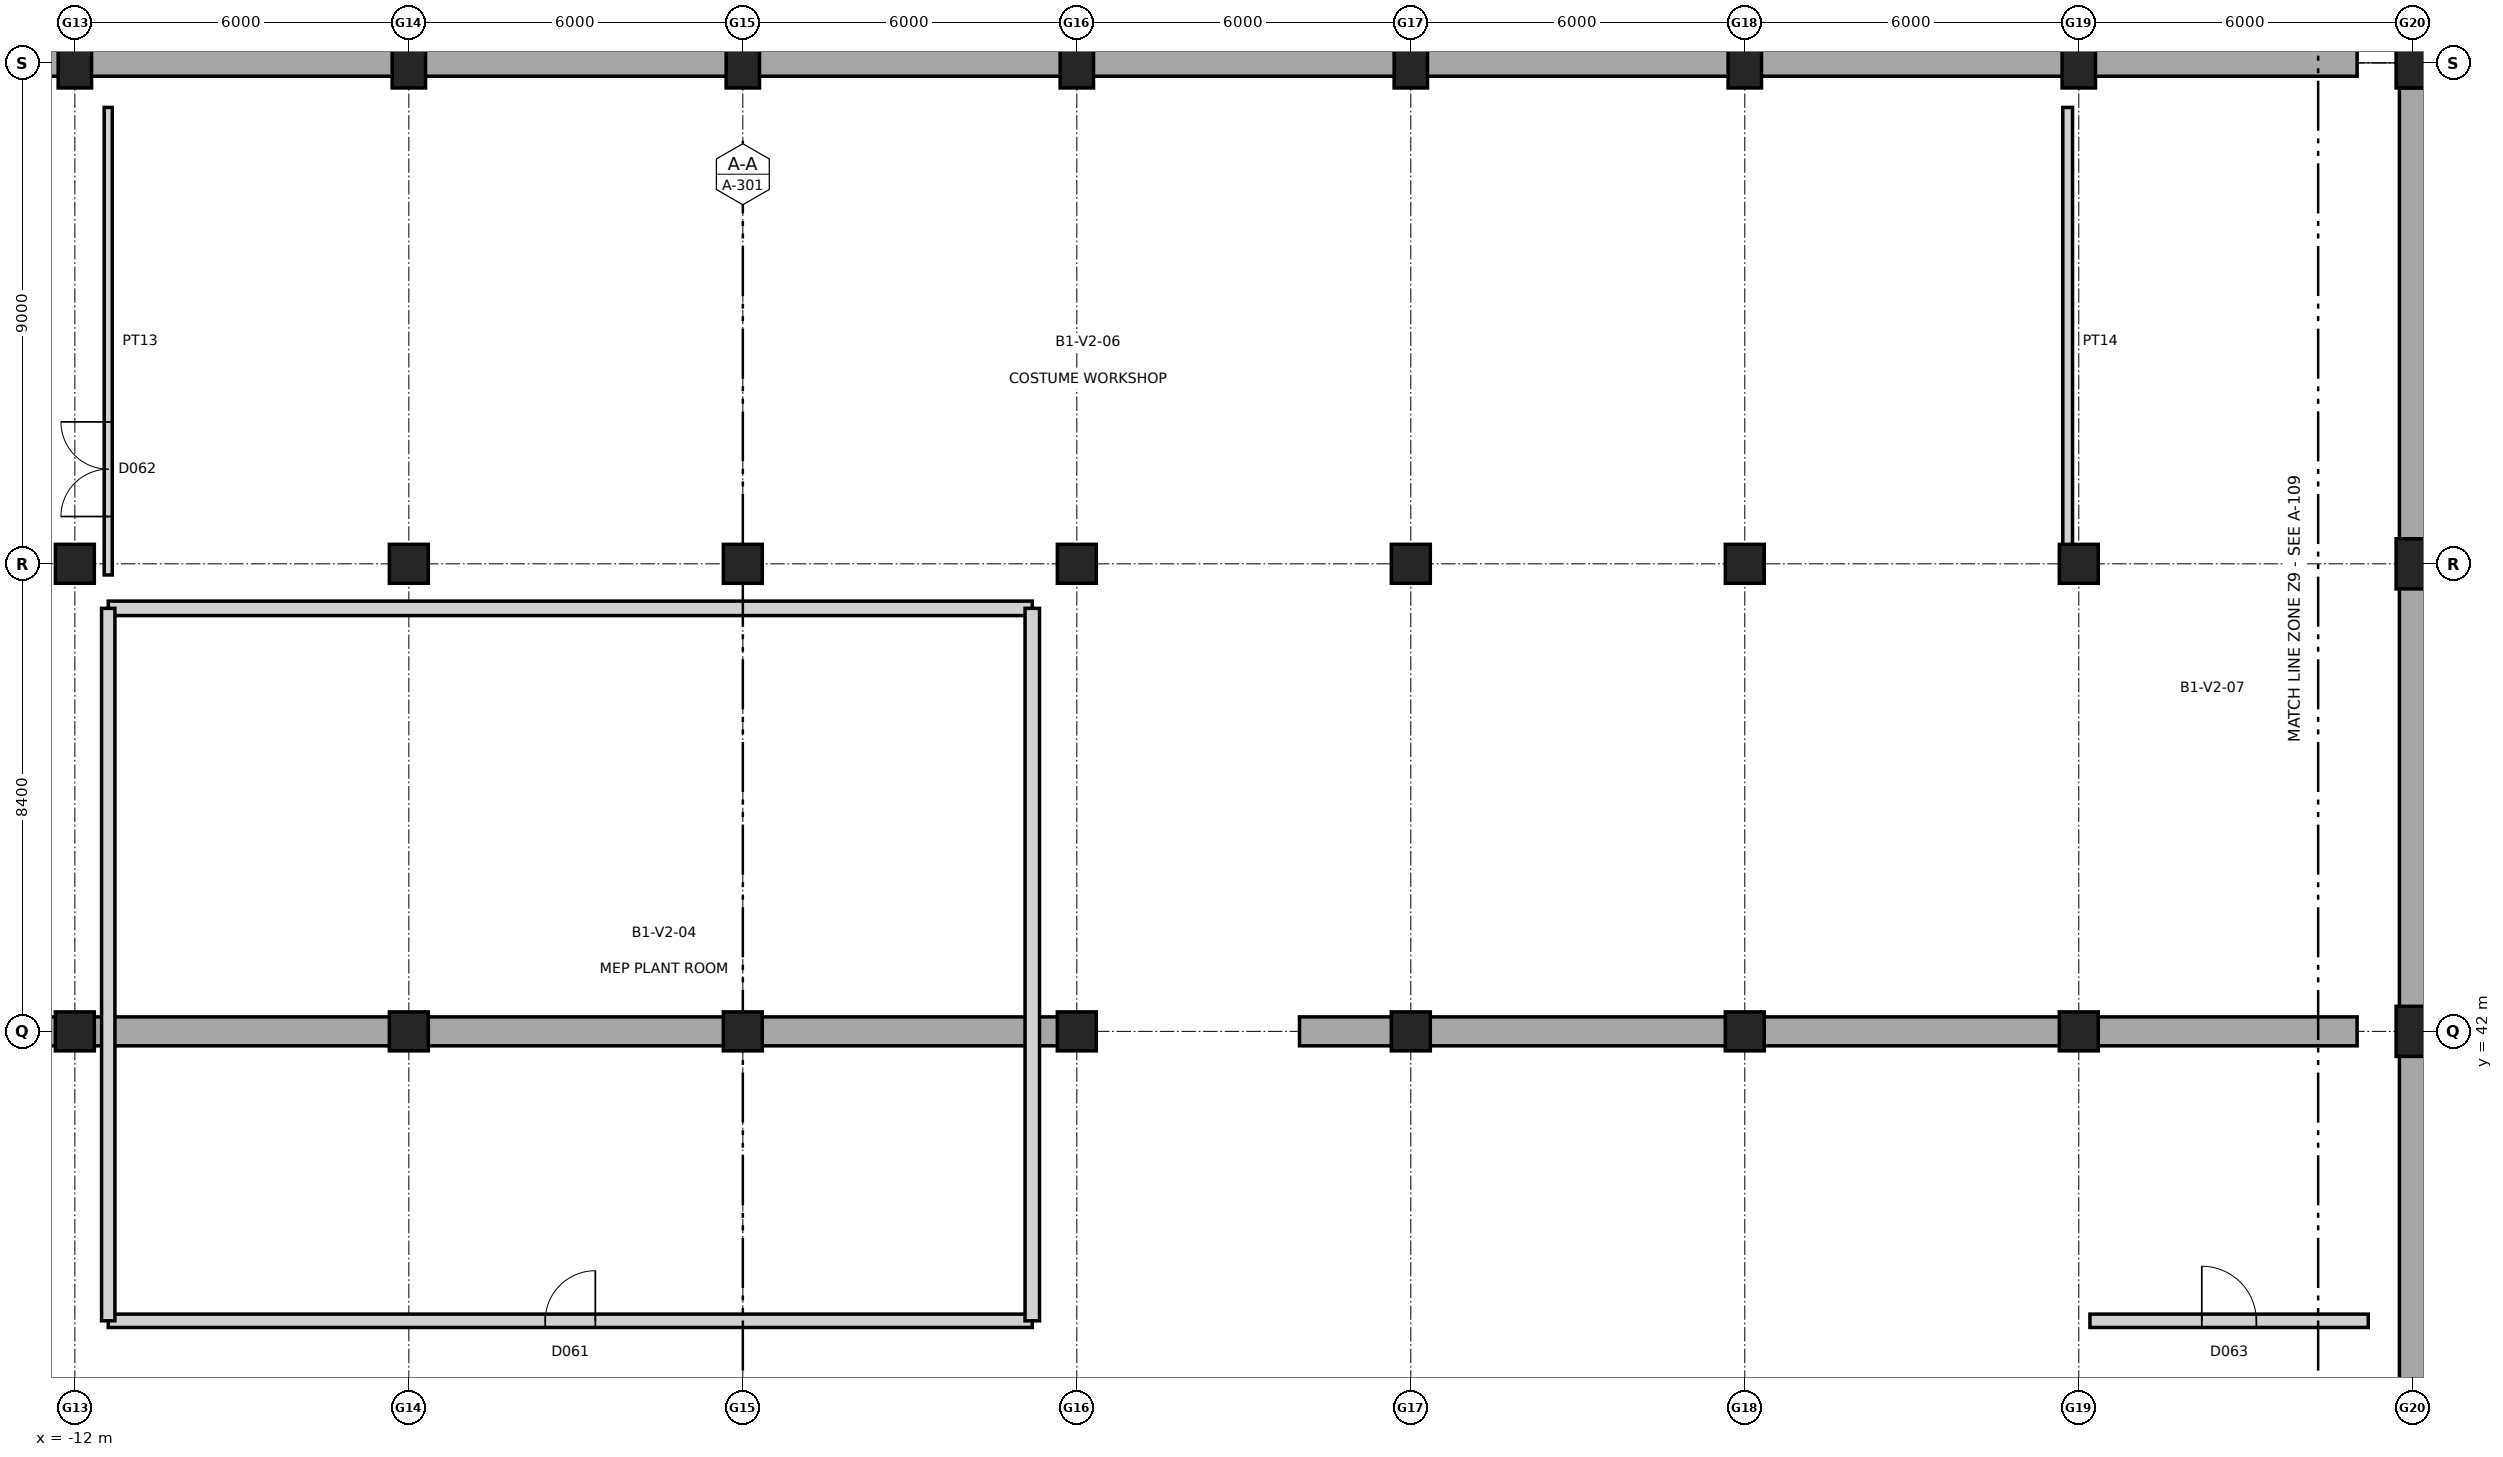
"""IFC4 building model, lengths in metres.
Left out: names, types, materials, properties, quantities, classifications, styles, units other than length and angle.
Written with IfcOpenShell. Run it as: python <this file> out.ifc"""

import sys

from ifc_helpers import new_model, si_unit, direction, frame, frame_2d, origin, origin_2d, place, context, subcontext, project, spatial, rectangle, extrude, element, fill, save


model = new_model("IFC4")
c1 = context("Model", 3, precision=1e-05, world=origin(), true_north=direction((0.0, 1.0)))
c2 = subcontext(c1, "Body", "Model", "MODEL_VIEW")
j1 = project(units=[si_unit("LENGTHUNIT", "METRE"), si_unit("PLANEANGLEUNIT", "RADIAN")], contexts=[c1])
p1 = place(None, origin())
s1 = spatial("IfcSite", under=j1, at=p1, CompositionType="ELEMENT")
p2 = place(p1, origin())
s2 = spatial("IfcBuilding", under=s1, at=p2, CompositionType="ELEMENT")
p3 = place(p2, frame((0.0, 0.0, -5.4)))
s3 = spatial("IfcBuildingStorey", under=s2, at=p3, CompositionType="ELEMENT", Elevation=-5.4)
for number, where, z_axis, x_axis in (
    (1, (-12.0, 42.0, 0.0), (0.0, 0.0, 1.0), (1.0, 0.0, 0.0)),
    (2, (-12.0, 50.4, 0.0), (0.0, 0.0, 1.0), (1.0, 0.0, 0.0)),
):
    element("IfcColumn", number, at=place(p3, frame(where, z_axis=z_axis, x_axis=x_axis)), inside=s3, PredefinedType="COLUMN", context=c2, shape_type="SweptSolid", body=[
        extrude(rectangle(XDim=0.7, YDim=0.7, at=origin_2d()), origin(), (0.0, 0.0, 1.0), 5.4),
    ])
p4 = place(p3, frame((-12.0, 59.4, 0.0), z_axis=(0.0, 0.0, 1.0), x_axis=(1.0, 0.0, 0.0)))
e3 = element("IfcColumn", 3, at=p4, inside=s3, PredefinedType="COLUMN", context=c2, shape_type="SweptSolid", body=[
    extrude(rectangle(XDim=0.6, YDim=0.9, at=origin_2d()), origin(), (0.0, 0.0, 1.0), 5.4),
])
for number, where, z_axis, x_axis in (
    (4, (-6.0, 42.0, 0.0), (0.0, 0.0, 1.0), (1.0, 0.0, 0.0)),
    (5, (-6.0, 50.4, 0.0), (0.0, 0.0, 1.0), (1.0, 0.0, 0.0)),
):
    element("IfcColumn", number, at=place(p3, frame(where, z_axis=z_axis, x_axis=x_axis)), inside=s3, PredefinedType="COLUMN", context=c2, shape_type="SweptSolid", body=[
        extrude(rectangle(XDim=0.7, YDim=0.7, at=origin_2d()), origin(), (0.0, 0.0, 1.0), 5.4),
    ])
p5 = place(p3, frame((-6.0, 59.4, 0.0), z_axis=(0.0, 0.0, 1.0), x_axis=(1.0, 0.0, 0.0)))
e6 = element("IfcColumn", 6, at=p5, inside=s3, PredefinedType="COLUMN", context=c2, shape_type="SweptSolid", body=[
    extrude(rectangle(XDim=0.6, YDim=0.9, at=origin_2d()), origin(), (0.0, 0.0, 1.0), 5.4),
])
for number, where, z_axis, x_axis in (
    (7, (0.0, 42.0, 0.0), (0.0, 0.0, 1.0), (1.0, 0.0, 0.0)),
    (8, (0.0, 50.4, 0.0), (0.0, 0.0, 1.0), (1.0, 0.0, 0.0)),
):
    element("IfcColumn", number, at=place(p3, frame(where, z_axis=z_axis, x_axis=x_axis)), inside=s3, PredefinedType="COLUMN", context=c2, shape_type="SweptSolid", body=[
        extrude(rectangle(XDim=0.7, YDim=0.7, at=origin_2d()), origin(), (0.0, 0.0, 1.0), 5.4),
    ])
p6 = place(p3, frame((0.0, 59.4, 0.0), z_axis=(0.0, 0.0, 1.0), x_axis=(1.0, 0.0, 0.0)))
e9 = element("IfcColumn", 9, at=p6, inside=s3, PredefinedType="COLUMN", context=c2, shape_type="SweptSolid", body=[
    extrude(rectangle(XDim=0.6, YDim=0.9, at=origin_2d()), origin(), (0.0, 0.0, 1.0), 5.4),
])
for number, where, z_axis, x_axis in (
    (10, (6.0, 42.0, 0.0), (0.0, 0.0, 1.0), (1.0, 0.0, 0.0)),
    (11, (6.0, 50.4, 0.0), (0.0, 0.0, 1.0), (1.0, 0.0, 0.0)),
):
    element("IfcColumn", number, at=place(p3, frame(where, z_axis=z_axis, x_axis=x_axis)), inside=s3, PredefinedType="COLUMN", context=c2, shape_type="SweptSolid", body=[
        extrude(rectangle(XDim=0.7, YDim=0.7, at=origin_2d()), origin(), (0.0, 0.0, 1.0), 5.4),
    ])
p7 = place(p3, frame((6.0, 59.4, 0.0), z_axis=(0.0, 0.0, 1.0), x_axis=(1.0, 0.0, 0.0)))
e12 = element("IfcColumn", 12, at=p7, inside=s3, PredefinedType="COLUMN", context=c2, shape_type="SweptSolid", body=[
    extrude(rectangle(XDim=0.6, YDim=0.9, at=origin_2d()), origin(), (0.0, 0.0, 1.0), 5.4),
])
for number, where, z_axis, x_axis in (
    (13, (12.0, 42.0, 0.0), (0.0, 0.0, 1.0), (1.0, 0.0, 0.0)),
    (14, (12.0, 50.4, 0.0), (0.0, 0.0, 1.0), (1.0, 0.0, 0.0)),
):
    element("IfcColumn", number, at=place(p3, frame(where, z_axis=z_axis, x_axis=x_axis)), inside=s3, PredefinedType="COLUMN", context=c2, shape_type="SweptSolid", body=[
        extrude(rectangle(XDim=0.7, YDim=0.7, at=origin_2d()), origin(), (0.0, 0.0, 1.0), 5.4),
    ])
p8 = place(p3, frame((12.0, 59.4, 0.0), z_axis=(0.0, 0.0, 1.0), x_axis=(1.0, 0.0, 0.0)))
e15 = element("IfcColumn", 15, at=p8, inside=s3, PredefinedType="COLUMN", context=c2, shape_type="SweptSolid", body=[
    extrude(rectangle(XDim=0.6, YDim=0.9, at=origin_2d()), origin(), (0.0, 0.0, 1.0), 5.4),
])
for number, where, z_axis, x_axis in (
    (16, (18.0, 42.0, 0.0), (0.0, 0.0, 1.0), (1.0, 0.0, 0.0)),
    (17, (18.0, 50.4, 0.0), (0.0, 0.0, 1.0), (1.0, 0.0, 0.0)),
):
    element("IfcColumn", number, at=place(p3, frame(where, z_axis=z_axis, x_axis=x_axis)), inside=s3, PredefinedType="COLUMN", context=c2, shape_type="SweptSolid", body=[
        extrude(rectangle(XDim=0.7, YDim=0.7, at=origin_2d()), origin(), (0.0, 0.0, 1.0), 5.4),
    ])
p9 = place(p3, frame((18.0, 59.4, 0.0), z_axis=(0.0, 0.0, 1.0), x_axis=(1.0, 0.0, 0.0)))
e18 = element("IfcColumn", 18, at=p9, inside=s3, PredefinedType="COLUMN", context=c2, shape_type="SweptSolid", body=[
    extrude(rectangle(XDim=0.6, YDim=0.9, at=origin_2d()), origin(), (0.0, 0.0, 1.0), 5.4),
])
for number, where, z_axis, x_axis in (
    (19, (24.0, 42.0, 0.0), (0.0, 0.0, 1.0), (1.0, 0.0, 0.0)),
    (20, (24.0, 50.4, 0.0), (0.0, 0.0, 1.0), (1.0, 0.0, 0.0)),
):
    element("IfcColumn", number, at=place(p3, frame(where, z_axis=z_axis, x_axis=x_axis)), inside=s3, PredefinedType="COLUMN", context=c2, shape_type="SweptSolid", body=[
        extrude(rectangle(XDim=0.7, YDim=0.7, at=origin_2d()), origin(), (0.0, 0.0, 1.0), 5.4),
    ])
for number, where, z_axis, x_axis in (
    (21, (24.0, 59.4, 0.0), (0.0, 0.0, 1.0), (1.0, 0.0, 0.0)),
    (22, (30.0, 42.0, 0.0), (0.0, 0.0, 1.0), (1.0, 0.0, 0.0)),
    (23, (30.0, 50.4, 0.0), (0.0, 0.0, 1.0), (1.0, 0.0, 0.0)),
    (24, (30.0, 59.4, 0.0), (0.0, 0.0, 1.0), (1.0, 0.0, 0.0)),
):
    element("IfcColumn", number, at=place(p3, frame(where, z_axis=z_axis, x_axis=x_axis)), inside=s3, PredefinedType="COLUMN", context=c2, shape_type="SweptSolid", body=[
        extrude(rectangle(XDim=0.6, YDim=0.9, at=origin_2d()), origin(), (0.0, 0.0, 1.0), 5.4),
    ])
p10 = place(p3, frame((30.0, 17.85, 0.0), z_axis=(0.0, 0.0, 1.0), x_axis=(0.0, 1.0, 0.0)))
e25 = element("IfcWall", 25, at=p10, inside=s3, PredefinedType="USERDEFINED", context=c2, shape_type="SweptSolid", body=[
    extrude(rectangle(XDim=41.1, YDim=0.48, at=frame_2d((20.55, 0.0))), origin(), (0.0, 0.0, 1.0), 5.11),
])
p11 = place(p3, frame((-23.0, 59.4, 0.0), z_axis=(0.0, 0.0, 1.0), x_axis=(1.0, 0.0, 0.0)))
e26 = element("IfcWall", 26, at=p11, inside=s3, PredefinedType="USERDEFINED", context=c2, shape_type="SweptSolid", body=[
    extrude(rectangle(XDim=52.0, YDim=0.48, at=frame_2d((26.0, 0.0))), origin(), (0.0, 0.0, 1.0), 5.11),
])
p12 = place(p3, frame((-17.0, 42.0, 0.0), z_axis=(0.0, 0.0, 1.0), x_axis=(1.0, 0.0, 0.0)))
e27 = element("IfcWall", 27, at=p12, inside=s3, PredefinedType="SHEAR", context=c2, shape_type="SweptSolid", body=[
    extrude(rectangle(XDim=23.0, YDim=0.52, at=frame_2d((11.5, 0.0))), origin(), (0.0, 0.0, 1.0), 5.4),
])
p13 = place(p3, frame((10.0, 42.0, 0.0), z_axis=(0.0, 0.0, 1.0), x_axis=(1.0, 0.0, 0.0)))
e28 = element("IfcWall", 28, at=p13, inside=s3, PredefinedType="SHEAR", context=c2, shape_type="SweptSolid", body=[
    extrude(rectangle(XDim=19.0, YDim=0.52, at=frame_2d((9.5, 0.0))), origin(), (0.0, 0.0, 1.0), 5.4),
])
p14 = place(p3, frame((-11.4, 36.8, 0.0), z_axis=(0.0, 0.0, 1.0), x_axis=(1.0, 0.0, 0.0)))
e29 = element("IfcWall", 29, at=p14, inside=s3, PredefinedType="PARTITIONING", context=c2, shape_type="SweptSolid", body=[
    extrude(rectangle(XDim=16.6, YDim=0.24, at=frame_2d((8.3, 0.0))), origin(), (0.0, 0.0, 1.0), 5.02),
])
p15 = place(p14, frame((7.85, 0.0, 0.0)))
e30 = element("IfcOpeningElement", 30, at=p15, cuts=e29, PredefinedType="OPENING", context=c2, shape_type="SweptSolid", body=[
    extrude(rectangle(XDim=0.9, YDim=2.1, at=frame_2d((0.45, 1.05))), frame((0.0, 0.13, 0.0), z_axis=(0.0, -1.0, 0.0), x_axis=(1.0, 0.0, 0.0)), (0.0, 0.0, 1.0), 0.26),
])
p16 = place(p3, frame((-11.4, 49.6, 0.0), z_axis=(0.0, 0.0, 1.0), x_axis=(1.0, 0.0, 0.0)))
e31 = element("IfcWall", 31, at=p16, inside=s3, PredefinedType="PARTITIONING", context=c2, shape_type="SweptSolid", body=[
    extrude(rectangle(XDim=16.6, YDim=0.26, at=frame_2d((8.3, 0.0))), origin(), (0.0, 0.0, 1.0), 5.02),
])
p17 = place(p3, frame((-11.4, 36.8, 0.0), z_axis=(0.0, 0.0, 1.0), x_axis=(0.0, 1.0, 0.0)))
e32 = element("IfcWall", 32, at=p17, inside=s3, PredefinedType="PARTITIONING", context=c2, shape_type="SweptSolid", body=[
    extrude(rectangle(XDim=12.8, YDim=0.24, at=frame_2d((6.4, 0.0))), origin(), (0.0, 0.0, 1.0), 5.02),
])
p18 = place(p3, frame((5.2, 36.8, 0.0), z_axis=(0.0, 0.0, 1.0), x_axis=(0.0, 1.0, 0.0)))
e33 = element("IfcWall", 33, at=p18, inside=s3, PredefinedType="PARTITIONING", context=c2, shape_type="SweptSolid", body=[
    extrude(rectangle(XDim=12.8, YDim=0.26, at=frame_2d((6.4, 0.0))), origin(), (0.0, 0.0, 1.0), 5.02),
])
p19 = place(p3, frame((-11.4, 50.2, 0.0), z_axis=(0.0, 0.0, 1.0), x_axis=(0.0, 1.0, 0.0)))
e34 = element("IfcWall", 34, at=p19, inside=s3, PredefinedType="PARTITIONING", context=c2, shape_type="SweptSolid", body=[
    extrude(rectangle(XDim=8.4, YDim=0.145, at=frame_2d((4.2, 0.0))), origin(), (0.0, 0.0, 1.0), 5.02),
])
p20 = place(p19, frame((1.05, 0.0, 0.0)))
e35 = element("IfcOpeningElement", 35, at=p20, cuts=e34, PredefinedType="OPENING", context=c2, shape_type="SweptSolid", body=[
    extrude(rectangle(XDim=1.7, YDim=2.25, at=frame_2d((0.85, 1.125))), frame((0.0, 0.083, 0.0), z_axis=(0.0, -1.0, 0.0), x_axis=(1.0, 0.0, 0.0)), (0.0, 0.0, 1.0), 0.165),
])
p21 = place(p3, frame((23.8, 50.2, 0.0), z_axis=(0.0, 0.0, 1.0), x_axis=(0.0, 1.0, 0.0)))
e36 = element("IfcWall", 36, at=p21, inside=s3, PredefinedType="PARTITIONING", context=c2, shape_type="SweptSolid", body=[
    extrude(rectangle(XDim=8.4, YDim=0.175, at=frame_2d((4.2, 0.0))), origin(), (0.0, 0.0, 1.0), 4.12),
])
p22 = place(p3, frame((24.2, 36.8, 0.0), z_axis=(0.0, 0.0, 1.0), x_axis=(1.0, 0.0, 0.0)))
e37 = element("IfcWall", 37, at=p22, inside=s3, PredefinedType="PARTITIONING", context=c2, shape_type="SweptSolid", body=[
    extrude(rectangle(XDim=5.0, YDim=0.24, at=frame_2d((2.5, 0.0))), origin(), (0.0, 0.0, 1.0), 5.02),
])
p23 = place(p22, frame((2.01, 0.0, 0.0)))
e38 = element("IfcOpeningElement", 38, at=p23, cuts=e37, PredefinedType="OPENING", context=c2, shape_type="SweptSolid", body=[
    extrude(rectangle(XDim=0.98, YDim=2.15, at=frame_2d((0.49, 1.075))), frame((0.0, 0.13, 0.0), z_axis=(0.0, -1.0, 0.0), x_axis=(1.0, 0.0, 0.0)), (0.0, 0.0, 1.0), 0.26),
])
p24 = place(p15, origin())
e39 = element("IfcDoor", 39, at=p24, inside=s3, OperationType="SINGLE_SWING_RIGHT", PredefinedType="DOOR", context=c2, shape_type="SweptSolid", body=[
    extrude(rectangle(XDim=0.9, YDim=2.1, at=frame_2d((0.45, 1.05))), frame((0.0, 0.025, 0.0), z_axis=(0.0, -1.0, 0.0), x_axis=(1.0, 0.0, 0.0)), (0.0, 0.0, 1.0), 0.05),
])
fill(e30, e39)
p25 = place(p20, origin())
e40 = element("IfcDoor", 40, at=p25, inside=s3, OperationType="DOUBLE_DOOR_SINGLE_SWING", PredefinedType="DOOR", context=c2, shape_type="SweptSolid", body=[
    extrude(rectangle(XDim=1.7, YDim=2.25, at=frame_2d((0.85, 1.125))), frame((0.0, 0.025, 0.0), z_axis=(0.0, -1.0, 0.0), x_axis=(1.0, 0.0, 0.0)), (0.0, 0.0, 1.0), 0.05),
])
fill(e35, e40)
p26 = place(p23, origin())
e41 = element("IfcDoor", 41, at=p26, inside=s3, OperationType="SINGLE_SWING_LEFT", PredefinedType="DOOR", context=c2, shape_type="SweptSolid", body=[
    extrude(rectangle(XDim=0.98, YDim=2.15, at=frame_2d((0.49, 1.075))), frame((0.0, 0.025, 0.0), z_axis=(0.0, -1.0, 0.0), x_axis=(1.0, 0.0, 0.0)), (0.0, 0.0, 1.0), 0.05),
])
fill(e38, e41)
save(model, sys.argv[1])
